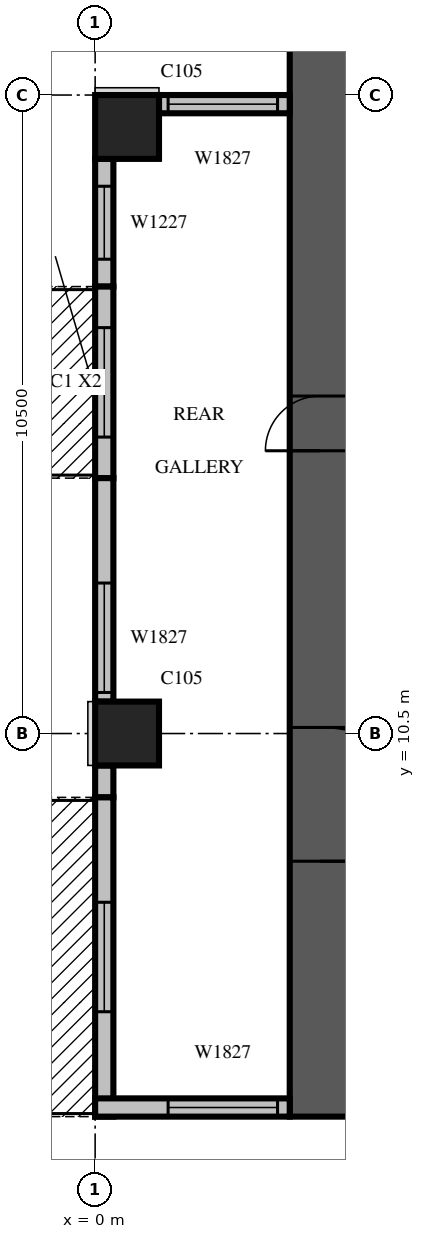
"""IFC4 building model, lengths in metres.
Left out: names, types, materials, properties, quantities, classifications, styles, units other than length and angle.
Written with IfcOpenShell. Run it as: python <this file> out.ifc"""

import sys

from ifc_helpers import new_model, si_unit, direction, frame, frame_2d, origin, origin_2d, place, context, subcontext, project, spatial, rectangle, extrude, source, transform, mapped, element, fill, save


model = new_model("IFC4")
c1 = context("Model", 3, precision=1e-05, world=origin(), true_north=direction((0.0, 1.0)))
c2 = subcontext(c1, "Body", "Model", "MODEL_VIEW")
j1 = project(units=[si_unit("LENGTHUNIT", "METRE"), si_unit("PLANEANGLEUNIT", "RADIAN")], contexts=[c1])
p1 = place(None, origin())
s1 = spatial("IfcSite", under=j1, at=p1, CompositionType="ELEMENT")
p2 = place(p1, origin())
s2 = spatial("IfcBuilding", under=s1, at=p2, CompositionType="ELEMENT")
p3 = place(p2, frame((0.0, 0.0, 141.3)))
s3 = spatial("IfcBuildingStorey", under=s2, at=p3, CompositionType="ELEMENT", Elevation=141.3)
m1 = source(origin(), c2, "Body", "SweptSolid", [
    extrude(rectangle(XDim=1.05, YDim=1.05, at=origin_2d()), origin(), (0.0, 0.0, 1.0), 4.2),
])
for number, where, z_axis, x_axis in (
    (1, (0.525, 10.5, 0.0), (0.0, 0.0, 1.0), (1.0, 0.0, 0.0)),
    (2, (0.525, 20.475, 0.0), (0.0, 0.0, 1.0), (1.0, 0.0, 0.0)),
):
    element("IfcColumn", number, at=place(p3, frame(where, z_axis=z_axis, x_axis=x_axis)), inside=s3, PredefinedType="COLUMN", context=c2, shape_type="MappedRepresentation", body=[
        mapped(m1, transform((0.0, 0.0, 0.0), scale=1.0)),
    ])
m2 = source(origin(), c2, "Body", "SweptSolid", [
    extrude(rectangle(XDim=17.8, YDim=1.0, at=frame_2d((8.9, 0.0))), origin(), (0.0, 0.0, 1.0), 4.2),
])
p4 = place(p3, frame((3.7, 4.2, 0.0), z_axis=(0.0, 0.0, 1.0), x_axis=(0.0, 1.0, 0.0)))
e3 = element("IfcWall", 3, at=p4, inside=s3, PredefinedType="SHEAR", context=c2, shape_type="MappedRepresentation", body=[
    mapped(m2, transform((0.0, 0.0, 0.0), scale=1.0)),
])
m3 = source(origin(), c2, "Body", "SweptSolid", [
    extrude(rectangle(XDim=2.2, YDim=2.1, at=frame_2d((1.1, 1.05))), frame((0.0, 0.51, 0.0), z_axis=(0.0, -1.0, 0.0), x_axis=(1.0, 0.0, 0.0)), (0.0, 0.0, 1.0), 1.02),
])
p5 = place(p4, frame((4.2, 0.0, 0.0)))
e4 = element("IfcOpeningElement", 4, at=p5, cuts=e3, PredefinedType="OPENING", context=c2, shape_type="MappedRepresentation", body=[
    mapped(m3, transform((0.0, 0.0, 0.0), scale=1.0)),
])
m4 = source(origin(), c2, "Body", "SweptSolid", [
    extrude(rectangle(XDim=0.9, YDim=2.1, at=frame_2d((0.45, 1.05))), frame((0.0, 0.51, 0.0), z_axis=(0.0, -1.0, 0.0), x_axis=(1.0, 0.0, 0.0)), (0.0, 0.0, 1.0), 1.02),
])
p6 = place(p4, frame((10.95, 0.0, 0.0)))
e5 = element("IfcOpeningElement", 5, at=p6, cuts=e3, PredefinedType="OPENING", context=c2, shape_type="MappedRepresentation", body=[
    mapped(m4, transform((0.0, 0.0, 0.0), scale=1.0)),
])
m5 = source(origin(), c2, "Body", "SweptSolid", [
    extrude(rectangle(XDim=2.15, YDim=0.3, at=frame_2d((1.075, 0.0))), origin(), (0.0, 0.0, 1.0), 3.8),
])
p7 = place(p3, frame((3.2, 20.85, 0.0), z_axis=(0.0, 0.0, 1.0), x_axis=(-1.0, 0.0, 0.0)))
e6 = element("IfcWall", 6, at=p7, inside=s3, PredefinedType="STANDARD", context=c2, shape_type="MappedRepresentation", body=[
    mapped(m5, transform((0.0, 0.0, 0.0), scale=1.0)),
])
m6 = source(origin(), c2, "Body", "SweptSolid", [
    extrude(rectangle(XDim=1.8, YDim=2.7, at=frame_2d((0.9, 1.35))), frame((0.0, 0.16, 0.0), z_axis=(0.0, -1.0, 0.0), x_axis=(1.0, 0.0, 0.0)), (0.0, 0.0, 1.0), 0.32),
])
p8 = place(p7, frame((0.2, 0.0, 0.6)))
e7 = element("IfcOpeningElement", 7, at=p8, cuts=e6, PredefinedType="OPENING", context=c2, shape_type="MappedRepresentation", body=[
    mapped(m6, transform((0.0, 0.0, 0.0), scale=1.0)),
])
m7 = source(origin(), c2, "Body", "SweptSolid", [
    extrude(rectangle(XDim=2.1, YDim=0.3, at=frame_2d((1.05, 0.0))), origin(), (0.0, 0.0, 1.0), 3.8),
])
p9 = place(p3, frame((0.15, 19.95, 0.0), z_axis=(0.0, 0.0, 1.0), x_axis=(0.0, -1.0, 0.0)))
e8 = element("IfcWall", 8, at=p9, inside=s3, PredefinedType="STANDARD", context=c2, shape_type="MappedRepresentation", body=[
    mapped(m7, transform((0.0, 0.0, 0.0), scale=1.0)),
])
m8 = source(origin(), c2, "Body", "SweptSolid", [
    extrude(rectangle(XDim=1.2, YDim=2.7, at=frame_2d((0.6, 1.35))), frame((0.0, 0.16, 0.0), z_axis=(0.0, -1.0, 0.0), x_axis=(1.0, 0.0, 0.0)), (0.0, 0.0, 1.0), 0.32),
])
p10 = place(p9, frame((0.45, 0.0, 0.6)))
e9 = element("IfcOpeningElement", 9, at=p10, cuts=e8, PredefinedType="OPENING", context=c2, shape_type="MappedRepresentation", body=[
    mapped(m8, transform((0.0, 0.0, 0.0), scale=1.0)),
])
m9 = source(origin(), c2, "Body", "SweptSolid", [
    extrude(rectangle(XDim=3.15, YDim=0.3, at=frame_2d((1.575, 0.0))), origin(), (0.0, 0.0, 1.0), 3.8),
])
p11 = place(p3, frame((0.15, 17.85, 0.0), z_axis=(0.0, 0.0, 1.0), x_axis=(0.0, -1.0, 0.0)))
e10 = element("IfcWall", 10, at=p11, inside=s3, PredefinedType="STANDARD", context=c2, shape_type="MappedRepresentation", body=[
    mapped(m9, transform((0.0, 0.0, 0.0), scale=1.0)),
])
m10 = source(origin(), c2, "Body", "SweptSolid", [
    extrude(rectangle(XDim=1.8, YDim=2.4, at=frame_2d((0.9, 1.2))), frame((0.0, 0.16, 0.0), z_axis=(0.0, -1.0, 0.0), x_axis=(1.0, 0.0, 0.0)), (0.0, 0.0, 1.0), 0.32),
])
p12 = place(p11, frame((0.675, 0.0, 0.0)))
e11 = element("IfcOpeningElement", 11, at=p12, cuts=e10, PredefinedType="OPENING", context=c2, shape_type="MappedRepresentation", body=[
    mapped(m10, transform((0.0, 0.0, 0.0), scale=1.0)),
])
m11 = source(origin(), c2, "Body", "SweptSolid", [
    extrude(rectangle(XDim=3.675, YDim=0.3, at=frame_2d((1.837, 0.0))), origin(), (0.0, 0.0, 1.0), 3.8),
])
p13 = place(p3, frame((0.15, 14.7, 0.0), z_axis=(0.0, 0.0, 1.0), x_axis=(0.0, -1.0, 0.0)))
e12 = element("IfcWall", 12, at=p13, inside=s3, PredefinedType="STANDARD", context=c2, shape_type="MappedRepresentation", body=[
    mapped(m11, transform((0.0, 0.0, 0.0), scale=1.0)),
])
p14 = place(p13, frame((1.725, 0.0, 0.6)))
e13 = element("IfcOpeningElement", 13, at=p14, cuts=e12, PredefinedType="OPENING", context=c2, shape_type="MappedRepresentation", body=[
    mapped(m6, transform((0.0, 0.0, 0.0), scale=1.0)),
])
m12 = source(origin(), c2, "Body", "SweptSolid", [
    extrude(rectangle(XDim=0.525, YDim=0.3, at=frame_2d((0.263, 0.0))), origin(), (0.0, 0.0, 1.0), 3.8),
])
p15 = place(p3, frame((0.15, 9.975, 0.0), z_axis=(0.0, 0.0, 1.0), x_axis=(0.0, -1.0, 0.0)))
e14 = element("IfcWall", 14, at=p15, inside=s3, PredefinedType="STANDARD", context=c2, shape_type="MappedRepresentation", body=[
    mapped(m12, transform((0.0, 0.0, 0.0), scale=1.0)),
])
m13 = source(origin(), c2, "Body", "SweptSolid", [
    extrude(rectangle(XDim=5.25, YDim=0.3, at=frame_2d((2.625, 0.0))), origin(), (0.0, 0.0, 1.0), 3.8),
])
p16 = place(p3, frame((0.15, 9.45, 0.0), z_axis=(0.0, 0.0, 1.0), x_axis=(0.0, -1.0, 0.0)))
e15 = element("IfcWall", 15, at=p16, inside=s3, PredefinedType="STANDARD", context=c2, shape_type="MappedRepresentation", body=[
    mapped(m13, transform((0.0, 0.0, 0.0), scale=1.0)),
])
p17 = place(p16, frame((1.725, 0.0, 0.0)))
e16 = element("IfcOpeningElement", 16, at=p17, cuts=e15, PredefinedType="OPENING", context=c2, shape_type="MappedRepresentation", body=[
    mapped(m10, transform((0.0, 0.0, 0.0), scale=1.0)),
])
m14 = source(origin(), c2, "Body", "SweptSolid", [
    extrude(rectangle(XDim=3.2, YDim=0.3, at=frame_2d((1.6, 0.0))), origin(), (0.0, 0.0, 1.0), 3.8),
])
p18 = place(p3, frame((0.0, 4.35, 0.0), z_axis=(0.0, 0.0, 1.0), x_axis=(1.0, 0.0, 0.0)))
e17 = element("IfcWall", 17, at=p18, inside=s3, PredefinedType="STANDARD", context=c2, shape_type="MappedRepresentation", body=[
    mapped(m14, transform((0.0, 0.0, 0.0), scale=1.0)),
])
p19 = place(p18, frame((1.2, 0.0, 0.6)))
e18 = element("IfcOpeningElement", 18, at=p19, cuts=e17, PredefinedType="OPENING", context=c2, shape_type="MappedRepresentation", body=[
    mapped(m6, transform((0.0, 0.0, 0.0), scale=1.0)),
])
m15 = source(origin(), c2, "Body", "SweptSolid", [
    extrude(rectangle(XDim=1.8, YDim=2.7, at=frame_2d((0.9, 1.35))), frame((0.0, 0.03, 0.0), z_axis=(0.0, -1.0, 0.0), x_axis=(1.0, 0.0, 0.0)), (0.0, 0.0, 1.0), 0.06),
])
p20 = place(p8, origin())
e19 = element("IfcWindow", 19, at=p20, inside=s3, PartitioningType="SINGLE_PANEL", PredefinedType="WINDOW", context=c2, shape_type="MappedRepresentation", body=[
    mapped(m15, transform((0.0, 0.0, 0.0), scale=1.0)),
])
fill(e7, e19)
m16 = source(origin(), c2, "Body", "SweptSolid", [
    extrude(rectangle(XDim=1.2, YDim=2.7, at=frame_2d((0.6, 1.35))), frame((0.0, 0.03, 0.0), z_axis=(0.0, -1.0, 0.0), x_axis=(1.0, 0.0, 0.0)), (0.0, 0.0, 1.0), 0.06),
])
p21 = place(p10, origin())
e20 = element("IfcWindow", 20, at=p21, inside=s3, PartitioningType="SINGLE_PANEL", PredefinedType="WINDOW", context=c2, shape_type="MappedRepresentation", body=[
    mapped(m16, transform((0.0, 0.0, 0.0), scale=1.0)),
])
fill(e9, e20)
m17 = source(origin(), c2, "Body", "SweptSolid", [
    extrude(rectangle(XDim=1.8, YDim=2.4, at=frame_2d((0.9, 1.2))), frame((0.0, 0.025, 0.0), z_axis=(0.0, -1.0, 0.0), x_axis=(1.0, 0.0, 0.0)), (0.0, 0.0, 1.0), 0.05),
])
p22 = place(p12, origin())
e21 = element("IfcDoor", 21, at=p22, inside=s3, OperationType="SLIDING_TO_LEFT", PredefinedType="DOOR", context=c2, shape_type="MappedRepresentation", body=[
    mapped(m17, transform((0.0, 0.0, 0.0), scale=1.0)),
])
fill(e11, e21)
p23 = place(p14, origin())
e22 = element("IfcWindow", 22, at=p23, inside=s3, PartitioningType="SINGLE_PANEL", PredefinedType="WINDOW", context=c2, shape_type="MappedRepresentation", body=[
    mapped(m15, transform((0.0, 0.0, 0.0), scale=1.0)),
])
fill(e13, e22)
p24 = place(p17, origin())
e23 = element("IfcDoor", 23, at=p24, inside=s3, OperationType="SLIDING_TO_LEFT", PredefinedType="DOOR", context=c2, shape_type="MappedRepresentation", body=[
    mapped(m17, transform((0.0, 0.0, 0.0), scale=1.0)),
])
fill(e16, e23)
p25 = place(p19, origin())
e24 = element("IfcWindow", 24, at=p25, inside=s3, PartitioningType="SINGLE_PANEL", PredefinedType="WINDOW", context=c2, shape_type="MappedRepresentation", body=[
    mapped(m15, transform((0.0, 0.0, 0.0), scale=1.0)),
])
fill(e18, e24)
m18 = source(origin(), c2, "Body", "SweptSolid", [
    extrude(rectangle(XDim=2.2, YDim=2.1, at=frame_2d((1.1, 1.05))), frame((0.0, 0.025, 0.0), z_axis=(0.0, -1.0, 0.0), x_axis=(1.0, 0.0, 0.0)), (0.0, 0.0, 1.0), 0.05),
])
p26 = place(p5, origin())
e25 = element("IfcDoor", 25, at=p26, inside=s3, OperationType="DOUBLE_DOOR_SINGLE_SWING", PredefinedType="DOOR", context=c2, shape_type="MappedRepresentation", body=[
    mapped(m18, transform((0.0, 0.0, 0.0), scale=1.0)),
])
fill(e4, e25)
m19 = source(origin(), c2, "Body", "SweptSolid", [
    extrude(rectangle(XDim=0.9, YDim=2.1, at=frame_2d((0.45, 1.05))), frame((0.0, 0.025, 0.0), z_axis=(0.0, -1.0, 0.0), x_axis=(1.0, 0.0, 0.0)), (0.0, 0.0, 1.0), 0.05),
])
p27 = place(p6, origin())
e26 = element("IfcDoor", 26, at=p27, inside=s3, OperationType="SINGLE_SWING_LEFT", PredefinedType="DOOR", context=c2, shape_type="MappedRepresentation", body=[
    mapped(m19, transform((0.0, 0.0, 0.0), scale=1.0)),
])
fill(e5, e26)
save(model, sys.argv[1])
